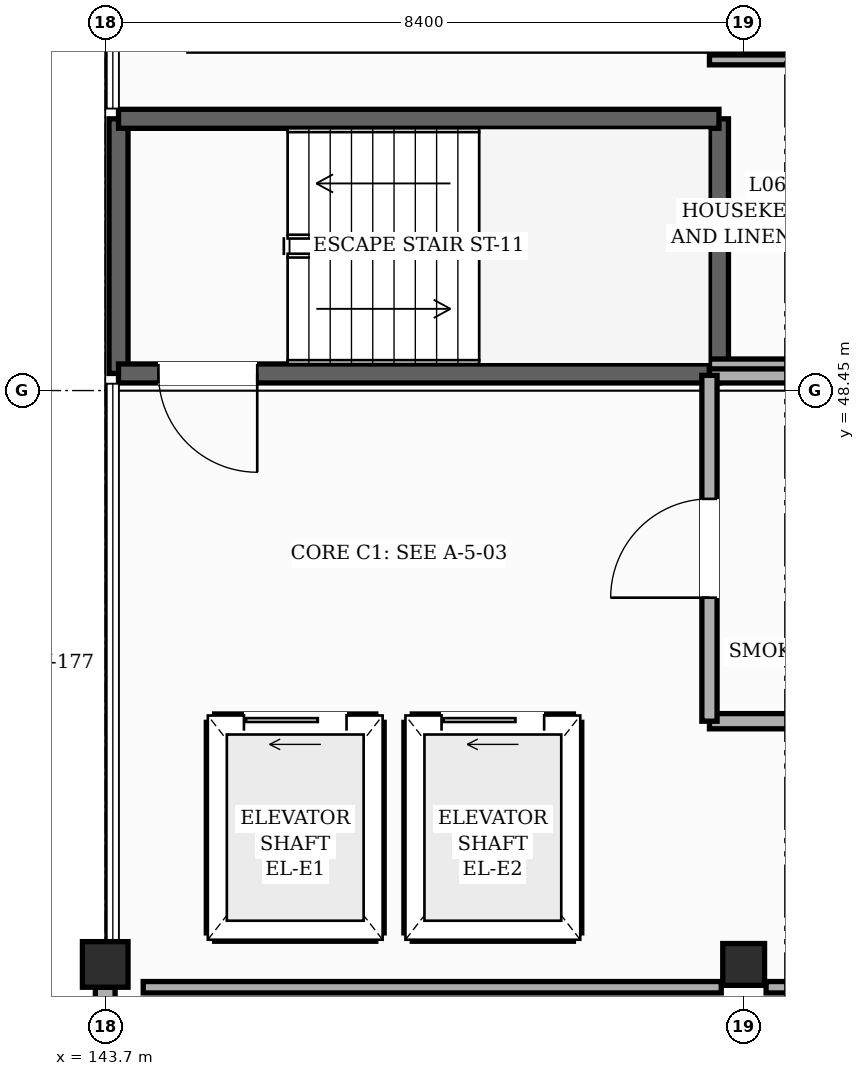
"""IFC4 building model, lengths in metres.
Left out: names, types, materials, properties, quantities, classifications, styles, units other than length and angle.
Written with IfcOpenShell. Run it as: python <this file> out.ifc"""

import sys

from ifc_helpers import new_model, si_unit, direction, frame, frame_2d, origin, origin_2d, place, context, subcontext, project, spatial, rectangle, hollow_rectangle, extrude, element, fill, save


model = new_model("IFC4")
c1 = context("Model", 3, precision=1e-05, world=origin(), true_north=direction((0.0, 1.0)))
c2 = subcontext(c1, "Body", "Model", "MODEL_VIEW")
j1 = project(units=[si_unit("LENGTHUNIT", "METRE"), si_unit("PLANEANGLEUNIT", "RADIAN")], contexts=[c1])
p1 = place(None, origin())
s1 = spatial("IfcSite", under=j1, at=p1, CompositionType="ELEMENT")
p2 = place(p1, origin())
s2 = spatial("IfcBuilding", under=s1, at=p2, CompositionType="ELEMENT")
p3 = place(p2, frame((0.0, 0.0, 28.2)))
s3 = spatial("IfcBuildingStorey", under=s2, at=p3, CompositionType="ELEMENT", Elevation=28.2)
p4 = place(p3, frame((143.7, 40.9, 0.0), z_axis=(0.0, 0.0, 1.0), x_axis=(1.0, 0.0, 0.0)))
e1 = element("IfcColumn", 1, at=p4, inside=s3, PredefinedType="COLUMN", context=c2, shape_type="SweptSolid", body=[
    extrude(hollow_rectangle(XDim=0.6, YDim=0.6, WallThickness=0.025, InnerFilletRadius=0.025, OuterFilletRadius=0.05, at=origin_2d()), origin(), (0.0, 0.0, 1.0), 3.6),
])
p5 = place(p3, frame((152.1, 40.9, 0.0), z_axis=(0.0, 0.0, 1.0), x_axis=(1.0, 0.0, 0.0)))
e2 = element("IfcColumn", 2, at=p5, inside=s3, PredefinedType="COLUMN", context=c2, shape_type="SweptSolid", body=[
    extrude(hollow_rectangle(XDim=0.55, YDim=0.55, WallThickness=0.022, InnerFilletRadius=0.022, OuterFilletRadius=0.044, at=origin_2d()), origin(), (0.0, 0.0, 1.0), 3.6),
])
p6 = place(p3, frame((143.7, 32.3, 0.0), z_axis=(0.0, 0.0, 1.0), x_axis=(0.0, 1.0, 0.0)))
e3 = element("IfcWall", 3, at=p6, inside=s3, PredefinedType="SOLIDWALL", context=c2, shape_type="SweptSolid", body=[
    extrude(rectangle(XDim=8.3, YDim=0.26, at=frame_2d((4.15, 0.0))), origin(), (0.0, 0.0, 1.0), 2.655),
])
p7 = place(p6, frame((0.325, 0.0, 0.85)))
e4 = element("IfcOpeningElement", 4, at=p7, cuts=e3, PredefinedType="OPENING", context=c2, shape_type="SweptSolid", body=[
    extrude(rectangle(XDim=0.85, YDim=1.35, at=frame_2d((0.425, 0.675))), frame((0.0, 0.14, 0.0), z_axis=(0.0, -1.0, 0.0), x_axis=(1.0, 0.0, 0.0)), (0.0, 0.0, 1.0), 0.28),
])
p8 = place(p6, frame((2.075, 0.0, 0.85)))
e5 = element("IfcOpeningElement", 5, at=p8, cuts=e3, PredefinedType="OPENING", context=c2, shape_type="SweptSolid", body=[
    extrude(rectangle(XDim=2.25, YDim=1.5, at=frame_2d((1.125, 0.75))), frame((0.0, 0.14, 0.0), z_axis=(0.0, -1.0, 0.0), x_axis=(1.0, 0.0, 0.0)), (0.0, 0.0, 1.0), 0.28),
])
p9 = place(p6, frame((5.925, 0.0, 0.85)))
e6 = element("IfcOpeningElement", 6, at=p9, cuts=e3, PredefinedType="OPENING", context=c2, shape_type="SweptSolid", body=[
    extrude(rectangle(XDim=1.35, YDim=1.35, at=frame_2d((0.675, 0.675))), frame((0.0, 0.14, 0.0), z_axis=(0.0, -1.0, 0.0), x_axis=(1.0, 0.0, 0.0)), (0.0, 0.0, 1.0), 0.28),
])
for number, where, z_axis, x_axis in (
    (7, (143.875, 48.675, 0.0), (0.0, 0.0, 1.0), (0.0, 1.0, 0.0)),
    (8, (151.775, 52.025, 0.0), (0.0, 0.0, 1.0), (0.0, -1.0, 0.0)),
):
    element("IfcWall", number, at=place(p3, frame(where, z_axis=z_axis, x_axis=x_axis)), inside=s3, PredefinedType="SHEAR", context=c2, shape_type="SweptSolid", body=[
        extrude(rectangle(XDim=3.35, YDim=0.25, at=frame_2d((1.675, 0.0))), origin(), (0.0, 0.0, 1.0), 3.38),
    ])
p10 = place(p3, frame((151.775, 48.675, 0.0), z_axis=(0.0, 0.0, 1.0), x_axis=(-1.0, 0.0, 0.0)))
e9 = element("IfcWall", 9, at=p10, inside=s3, PredefinedType="SHEAR", context=c2, shape_type="SweptSolid", body=[
    extrude(rectangle(XDim=7.9, YDim=0.25, at=frame_2d((3.95, 0.0))), origin(), (0.0, 0.0, 1.0), 3.38),
])
p11 = place(p10, frame((6.075, 0.0, 0.0)))
e10 = element("IfcOpeningElement", 10, at=p11, cuts=e9, PredefinedType="OPENING", context=c2, shape_type="SweptSolid", body=[
    extrude(rectangle(XDim=1.3, YDim=2.2, at=frame_2d((0.65, 1.1))), frame((0.0, 0.135, 0.0), z_axis=(0.0, -1.0, 0.0), x_axis=(1.0, 0.0, 0.0)), (0.0, 0.0, 1.0), 0.27),
])
p12 = place(p3, frame((143.875, 52.025, 0.0), z_axis=(0.0, 0.0, 1.0), x_axis=(1.0, 0.0, 0.0)))
e11 = element("IfcWall", 11, at=p12, inside=s3, PredefinedType="SHEAR", context=c2, shape_type="SweptSolid", body=[
    extrude(rectangle(XDim=7.9, YDim=0.25, at=frame_2d((3.95, 0.0))), origin(), (0.0, 0.0, 1.0), 3.38),
])
p13 = place(p3, frame((145.14, 44.085, 0.0), z_axis=(0.0, 0.0, 1.0), x_axis=(1.0, 0.0, 0.0)))
e12 = element("IfcWall", 12, at=p13, inside=s3, PredefinedType="SHEAR", context=c2, shape_type="SweptSolid", body=[
    extrude(rectangle(XDim=2.12, YDim=0.22, at=frame_2d((1.06, 0.0))), origin(), (0.0, 0.0, 1.0), 3.38),
])
p14 = place(p13, frame((0.385, 0.0, 0.0)))
e13 = element("IfcOpeningElement", 13, at=p14, cuts=e12, PredefinedType="OPENING", context=c2, shape_type="SweptSolid", body=[
    extrude(rectangle(XDim=1.35, YDim=2.3, at=frame_2d((0.675, 1.15))), frame((0.0, 0.12, 0.0), z_axis=(0.0, -1.0, 0.0), x_axis=(1.0, 0.0, 0.0)), (0.0, 0.0, 1.0), 0.24),
])
p15 = place(p3, frame((145.14, 41.315, 0.0), z_axis=(0.0, 0.0, 1.0), x_axis=(1.0, 0.0, 0.0)))
e14 = element("IfcWall", 14, at=p15, inside=s3, PredefinedType="SHEAR", context=c2, shape_type="SweptSolid", body=[
    extrude(rectangle(XDim=2.12, YDim=0.22, at=frame_2d((1.06, 0.0))), origin(), (0.0, 0.0, 1.0), 3.38),
])
for number, where, z_axis, x_axis in (
    (15, (147.26, 41.315, 0.0), (0.0, 0.0, 1.0), (0.0, 1.0, 0.0)),
    (16, (145.14, 41.315, 0.0), (0.0, 0.0, 1.0), (0.0, 1.0, 0.0)),
):
    element("IfcWall", number, at=place(p3, frame(where, z_axis=z_axis, x_axis=x_axis)), inside=s3, PredefinedType="SHEAR", context=c2, shape_type="SweptSolid", body=[
        extrude(rectangle(XDim=2.77, YDim=0.22, at=frame_2d((1.385, 0.0))), origin(), (0.0, 0.0, 1.0), 3.38),
    ])
p16 = place(p3, frame((147.74, 44.085, 0.0), z_axis=(0.0, 0.0, 1.0), x_axis=(1.0, 0.0, 0.0)))
e17 = element("IfcWall", 17, at=p16, inside=s3, PredefinedType="SHEAR", context=c2, shape_type="SweptSolid", body=[
    extrude(rectangle(XDim=2.12, YDim=0.22, at=frame_2d((1.06, 0.0))), origin(), (0.0, 0.0, 1.0), 3.38),
])
p17 = place(p16, frame((0.385, 0.0, 0.0)))
e18 = element("IfcOpeningElement", 18, at=p17, cuts=e17, PredefinedType="OPENING", context=c2, shape_type="SweptSolid", body=[
    extrude(rectangle(XDim=1.35, YDim=2.3, at=frame_2d((0.675, 1.15))), frame((0.0, 0.12, 0.0), z_axis=(0.0, -1.0, 0.0), x_axis=(1.0, 0.0, 0.0)), (0.0, 0.0, 1.0), 0.24),
])
p18 = place(p3, frame((147.74, 41.315, 0.0), z_axis=(0.0, 0.0, 1.0), x_axis=(1.0, 0.0, 0.0)))
e19 = element("IfcWall", 19, at=p18, inside=s3, PredefinedType="SHEAR", context=c2, shape_type="SweptSolid", body=[
    extrude(rectangle(XDim=2.12, YDim=0.22, at=frame_2d((1.06, 0.0))), origin(), (0.0, 0.0, 1.0), 3.38),
])
for number, where, z_axis, x_axis in (
    (20, (149.86, 41.315, 0.0), (0.0, 0.0, 1.0), (0.0, 1.0, 0.0)),
    (21, (147.74, 41.315, 0.0), (0.0, 0.0, 1.0), (0.0, 1.0, 0.0)),
):
    element("IfcWall", number, at=place(p3, frame(where, z_axis=z_axis, x_axis=x_axis)), inside=s3, PredefinedType="SHEAR", context=c2, shape_type="SweptSolid", body=[
        extrude(rectangle(XDim=2.77, YDim=0.22, at=frame_2d((1.385, 0.0))), origin(), (0.0, 0.0, 1.0), 3.38),
    ])
p19 = place(p3, frame((144.2, 40.6, 0.0), z_axis=(0.0, 0.0, 1.0), x_axis=(1.0, 0.0, 0.0)))
e22 = element("IfcWall", 22, at=p19, inside=s3, PredefinedType="PARTITIONING", context=c2, shape_type="SweptSolid", body=[
    extrude(rectangle(XDim=7.605, YDim=0.15, at=frame_2d((3.802, 0.0))), origin(), (0.0, 0.0, 1.0), 2.805),
])
p20 = place(p3, frame((152.395, 40.6, 0.0), z_axis=(0.0, 0.0, 1.0), x_axis=(1.0, 0.0, 0.0)))
e23 = element("IfcWall", 23, at=p20, inside=s3, PredefinedType="PARTITIONING", context=c2, shape_type="SweptSolid", body=[
    extrude(rectangle(XDim=2.805, YDim=0.15, at=frame_2d((1.402, 0.0))), origin(), (0.0, 0.0, 1.0), 2.805),
])
for number, where, z_axis, x_axis in (
    (24, (151.65, 44.1, 0.0), (0.0, 0.0, 1.0), (1.0, 0.0, 0.0)),
    (25, (151.65, 48.65, 0.0), (0.0, 0.0, 1.0), (1.0, 0.0, 0.0)),
):
    element("IfcWall", number, at=place(p3, frame(where, z_axis=z_axis, x_axis=x_axis)), inside=s3, PredefinedType="SOLIDWALL", context=c2, shape_type="SweptSolid", body=[
        extrude(rectangle(XDim=3.55, YDim=0.2, at=frame_2d((1.775, 0.0))), origin(), (0.0, 0.0, 1.0), 3.365),
    ])
for number, where, z_axis, x_axis in (
    (26, (151.65, 48.8, 0.0), (0.0, 0.0, 1.0), (1.0, 0.0, 0.0)),
    (27, (151.65, 52.8, 0.0), (0.0, 0.0, 1.0), (1.0, 0.0, 0.0)),
):
    element("IfcWall", number, at=place(p3, frame(where, z_axis=z_axis, x_axis=x_axis)), inside=s3, PredefinedType="PARTITIONING", context=c2, shape_type="SweptSolid", body=[
        extrude(rectangle(XDim=3.55, YDim=0.13, at=frame_2d((1.775, 0.0))), origin(), (0.0, 0.0, 1.0), 3.365),
    ])
p21 = place(p3, frame((151.65, 44.1, 0.0), z_axis=(0.0, 0.0, 1.0), x_axis=(0.0, 1.0, 0.0)))
e28 = element("IfcWall", 28, at=p21, inside=s3, PredefinedType="SOLIDWALL", context=c2, shape_type="SweptSolid", body=[
    extrude(rectangle(XDim=4.55, YDim=0.2, at=frame_2d((2.275, 0.0))), origin(), (0.0, 0.0, 1.0), 3.365),
])
p22 = place(p21, frame((1.625, 0.0, 0.0)))
e29 = element("IfcOpeningElement", 29, at=p22, cuts=e28, PredefinedType="OPENING", context=c2, shape_type="SweptSolid", body=[
    extrude(rectangle(XDim=1.3, YDim=2.2, at=frame_2d((0.65, 1.1))), frame((0.0, 0.11, 0.0), z_axis=(0.0, -1.0, 0.0), x_axis=(1.0, 0.0, 0.0)), (0.0, 0.0, 1.0), 0.22),
])
p23 = place(p11, origin())
e30 = element("IfcDoor", 30, at=p23, inside=s3, OperationType="SINGLE_SWING_LEFT", PredefinedType="DOOR", context=c2, shape_type="SweptSolid", body=[
    extrude(rectangle(XDim=1.3, YDim=2.2, at=frame_2d((0.65, 1.1))), frame((0.0, 0.025, 0.0), z_axis=(0.0, -1.0, 0.0), x_axis=(1.0, 0.0, 0.0)), (0.0, 0.0, 1.0), 0.05),
])
fill(e10, e30)
p24 = place(p14, origin())
e31 = element("IfcDoor", 31, at=p24, inside=s3, OperationType="SLIDING_TO_LEFT", PredefinedType="DOOR", context=c2, shape_type="SweptSolid", body=[
    extrude(rectangle(XDim=1.35, YDim=2.3, at=frame_2d((0.675, 1.15))), frame((0.0, 0.025, 0.0), z_axis=(0.0, -1.0, 0.0), x_axis=(1.0, 0.0, 0.0)), (0.0, 0.0, 1.0), 0.05),
])
fill(e13, e31)
p25 = place(p17, origin())
e32 = element("IfcDoor", 32, at=p25, inside=s3, OperationType="SLIDING_TO_LEFT", PredefinedType="DOOR", context=c2, shape_type="SweptSolid", body=[
    extrude(rectangle(XDim=1.35, YDim=2.3, at=frame_2d((0.675, 1.15))), frame((0.0, 0.025, 0.0), z_axis=(0.0, -1.0, 0.0), x_axis=(1.0, 0.0, 0.0)), (0.0, 0.0, 1.0), 0.05),
])
fill(e18, e32)
p26 = place(p22, origin())
e33 = element("IfcDoor", 33, at=p26, inside=s3, OperationType="SINGLE_SWING_LEFT", PredefinedType="DOOR", context=c2, shape_type="SweptSolid", body=[
    extrude(rectangle(XDim=1.3, YDim=2.2, at=frame_2d((0.65, 1.1))), frame((0.0, 0.025, 0.0), z_axis=(0.0, -1.0, 0.0), x_axis=(1.0, 0.0, 0.0)), (0.0, 0.0, 1.0), 0.05),
])
fill(e29, e33)
save(model, sys.argv[1])
